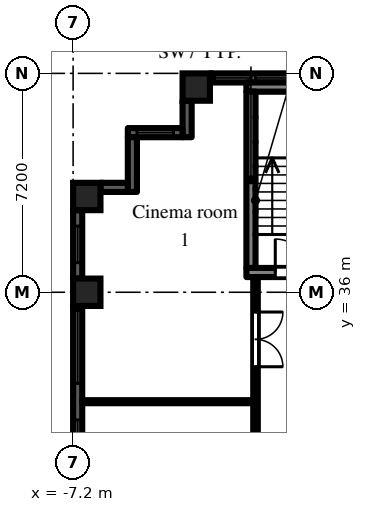
"""IFC4 building model, lengths in metres.
Left out: names, types, materials, properties, quantities, classifications, styles, units other than length and angle.
Written with IfcOpenShell. Run it as: python <this file> out.ifc"""

import sys

from ifc_helpers import new_model, si_unit, direction, frame, frame_2d, origin, origin_2d, place, context, subcontext, project, spatial, rectangle, extrude, element, fill, save


model = new_model("IFC4")
c1 = context("Model", 3, precision=1e-05, world=origin(), true_north=direction((0.0, 1.0)))
c2 = subcontext(c1, "Body", "Model", "MODEL_VIEW")
j1 = project(units=[si_unit("LENGTHUNIT", "METRE"), si_unit("PLANEANGLEUNIT", "RADIAN")], contexts=[c1])
p1 = place(None, origin())
s1 = spatial("IfcSite", under=j1, at=p1, CompositionType="ELEMENT")
p2 = place(p1, origin())
s2 = spatial("IfcBuilding", under=s1, at=p2, CompositionType="ELEMENT")
p3 = place(p2, frame((0.0, 0.0, 35.7)))
s3 = spatial("IfcBuildingStorey", under=s2, at=p3, CompositionType="ELEMENT", Elevation=35.7)
for number, where, z_axis, x_axis in (
    (1, (-6.75, 36.0, 0.0), (0.0, 0.0, 1.0), (1.0, 0.0, 0.0)),
    (2, (-6.75, 39.15, 0.0), (0.0, 0.0, 1.0), (1.0, 0.0, 0.0)),
    (3, (-3.15, 42.75, 0.0), (0.0, 0.0, 1.0), (1.0, 0.0, 0.0)),
):
    element("IfcColumn", number, at=place(p3, frame(where, z_axis=z_axis, x_axis=x_axis)), inside=s3, PredefinedType="COLUMN", context=c2, shape_type="SweptSolid", body=[
        extrude(rectangle(XDim=0.9, YDim=0.9, at=origin_2d()), origin(), (0.0, 0.0, 1.0), 3.0),
    ])
p4 = place(p3, frame((2.7, 43.05, 0.0), z_axis=(0.0, 0.0, 1.0), x_axis=(-1.0, 0.0, 0.0)))
e4 = element("IfcWall", 4, at=p4, inside=s3, PredefinedType="SOLIDWALL", context=c2, shape_type="SweptSolid", body=[
    extrude(rectangle(XDim=5.4, YDim=0.3, at=frame_2d((2.7, 0.0))), origin(), (0.0, 0.0, 1.0), 2.1),
])
p5 = place(p4, frame((1.5, 0.0, 0.2)))
e5 = element("IfcOpeningElement", 5, at=p5, cuts=e4, PredefinedType="OPENING", context=c2, shape_type="SweptSolid", body=[
    extrude(rectangle(XDim=2.4, YDim=1.85, at=frame_2d((1.2, 0.925))), frame((0.0, 0.16, 0.0), z_axis=(0.0, -1.0, 0.0), x_axis=(1.0, 0.0, 0.0)), (0.0, 0.0, 1.0), 0.32),
])
p6 = place(p4, frame((0.15, 0.0, 0.2)))
e6 = element("IfcOpeningElement", 6, at=p6, cuts=e4, PredefinedType="OPENING", context=c2, shape_type="SweptSolid", body=[
    extrude(rectangle(XDim=1.2, YDim=1.85, at=frame_2d((0.6, 0.925))), frame((0.0, 0.16, 0.0), z_axis=(0.0, -1.0, 0.0), x_axis=(1.0, 0.0, 0.0)), (0.0, 0.0, 1.0), 0.32),
])
p7 = place(p4, frame((4.05, 0.0, 0.2)))
e7 = element("IfcOpeningElement", 7, at=p7, cuts=e4, PredefinedType="OPENING", context=c2, shape_type="SweptSolid", body=[
    extrude(rectangle(XDim=1.2, YDim=1.85, at=frame_2d((0.6, 0.925))), frame((0.0, 0.16, 0.0), z_axis=(0.0, -1.0, 0.0), x_axis=(1.0, 0.0, 0.0)), (0.0, 0.0, 1.0), 0.32),
])
p8 = place(p3, frame((-3.45, 42.3, 0.0), z_axis=(0.0, 0.0, 1.0), x_axis=(0.0, -1.0, 0.0)))
e8 = element("IfcWall", 8, at=p8, inside=s3, PredefinedType="SOLIDWALL", context=c2, shape_type="SweptSolid", body=[
    extrude(rectangle(XDim=1.2, YDim=0.3, at=frame_2d((0.6, 0.0))), origin(), (0.0, 0.0, 1.0), 2.575),
])
p9 = place(p3, frame((-3.6, 41.25, 0.0), z_axis=(0.0, 0.0, 1.0), x_axis=(-1.0, 0.0, 0.0)))
e9 = element("IfcWall", 9, at=p9, inside=s3, PredefinedType="SOLIDWALL", context=c2, shape_type="SweptSolid", body=[
    extrude(rectangle(XDim=1.8, YDim=0.3, at=frame_2d((0.9, 0.0))), origin(), (0.0, 0.0, 1.0), 2.575),
])
p10 = place(p9, frame((0.3, 0.0, 0.2)))
e10 = element("IfcOpeningElement", 10, at=p10, cuts=e9, PredefinedType="OPENING", context=c2, shape_type="SweptSolid", body=[
    extrude(rectangle(XDim=1.2, YDim=1.85, at=frame_2d((0.6, 0.925))), frame((0.0, 0.16, 0.0), z_axis=(0.0, -1.0, 0.0), x_axis=(1.0, 0.0, 0.0)), (0.0, 0.0, 1.0), 0.32),
])
p11 = place(p3, frame((-5.25, 41.1, 0.0), z_axis=(0.0, 0.0, 1.0), x_axis=(0.0, -1.0, 0.0)))
e11 = element("IfcWall", 11, at=p11, inside=s3, PredefinedType="SOLIDWALL", context=c2, shape_type="SweptSolid", body=[
    extrude(rectangle(XDim=1.8, YDim=0.3, at=frame_2d((0.9, 0.0))), origin(), (0.0, 0.0, 1.0), 2.575),
])
p12 = place(p3, frame((-5.4, 39.45, 0.0), z_axis=(0.0, 0.0, 1.0), x_axis=(-1.0, 0.0, 0.0)))
e12 = element("IfcWall", 12, at=p12, inside=s3, PredefinedType="SOLIDWALL", context=c2, shape_type="SweptSolid", body=[
    extrude(rectangle(XDim=0.9, YDim=0.3, at=frame_2d((0.45, 0.0))), origin(), (0.0, 0.0, 1.0), 2.575),
])
p13 = place(p3, frame((-7.05, 38.7, 0.0), z_axis=(0.0, 0.0, 1.0), x_axis=(0.0, -1.0, 0.0)))
e13 = element("IfcWall", 13, at=p13, inside=s3, PredefinedType="SOLIDWALL", context=c2, shape_type="SweptSolid", body=[
    extrude(rectangle(XDim=2.25, YDim=0.3, at=frame_2d((1.125, 0.0))), origin(), (0.0, 0.0, 1.0), 2.1),
])
p14 = place(p13, frame((0.525, 0.0, 0.2)))
e14 = element("IfcOpeningElement", 14, at=p14, cuts=e13, PredefinedType="OPENING", context=c2, shape_type="SweptSolid", body=[
    extrude(rectangle(XDim=1.2, YDim=1.85, at=frame_2d((0.6, 0.925))), frame((0.0, 0.16, 0.0), z_axis=(0.0, -1.0, 0.0), x_axis=(1.0, 0.0, 0.0)), (0.0, 0.0, 1.0), 0.32),
])
p15 = place(p3, frame((-7.05, 35.55, 0.0), z_axis=(0.0, 0.0, 1.0), x_axis=(0.0, -1.0, 0.0)))
e15 = element("IfcWall", 15, at=p15, inside=s3, PredefinedType="SOLIDWALL", context=c2, shape_type="SweptSolid", body=[
    extrude(rectangle(XDim=6.3, YDim=0.3, at=frame_2d((3.15, 0.0))), origin(), (0.0, 0.0, 1.0), 2.1),
])
p16 = place(p15, frame((0.15, 0.0, 0.2)))
e16 = element("IfcOpeningElement", 16, at=p16, cuts=e15, PredefinedType="OPENING", context=c2, shape_type="SweptSolid", body=[
    extrude(rectangle(XDim=2.4, YDim=1.85, at=frame_2d((1.2, 0.925))), frame((0.0, 0.16, 0.0), z_axis=(0.0, -1.0, 0.0), x_axis=(1.0, 0.0, 0.0)), (0.0, 0.0, 1.0), 0.32),
])
p17 = place(p15, frame((3.75, 0.0, 0.2)))
e17 = element("IfcOpeningElement", 17, at=p17, cuts=e15, PredefinedType="OPENING", context=c2, shape_type="SweptSolid", body=[
    extrude(rectangle(XDim=2.4, YDim=1.85, at=frame_2d((1.2, 0.925))), frame((0.0, 0.16, 0.0), z_axis=(0.0, -1.0, 0.0), x_axis=(1.0, 0.0, 0.0)), (0.0, 0.0, 1.0), 0.32),
])
p18 = place(p3, frame((-1.5, 36.65, 0.0), z_axis=(0.0, 0.0, 1.0), x_axis=(1.0, 0.0, 0.0)))
e18 = element("IfcWall", 18, at=p18, inside=s3, PredefinedType="SHEAR", context=c2, shape_type="SweptSolid", body=[
    extrude(rectangle(XDim=3.0, YDim=0.3, at=frame_2d((1.5, 0.0))), origin(), (0.0, 0.0, 1.0), 2.575),
])
p19 = place(p18, frame((0.95, 0.0, 0.0)))
e19 = element("IfcOpeningElement", 19, at=p19, cuts=e18, PredefinedType="OPENING", context=c2, shape_type="SweptSolid", body=[
    extrude(rectangle(XDim=1.1, YDim=2.1, at=frame_2d((0.55, 1.05))), frame((0.0, 0.16, 0.0), z_axis=(0.0, -1.0, 0.0), x_axis=(1.0, 0.0, 0.0)), (0.0, 0.0, 1.0), 0.32),
])
p20 = place(p3, frame((-1.5, 42.75, 0.0), z_axis=(0.0, 0.0, 1.0), x_axis=(1.0, 0.0, 0.0)))
e20 = element("IfcWall", 20, at=p20, inside=s3, PredefinedType="SHEAR", context=c2, shape_type="SweptSolid", body=[
    extrude(rectangle(XDim=3.0, YDim=0.3, at=frame_2d((1.5, 0.0))), origin(), (0.0, 0.0, 1.0), 2.575),
])
p21 = place(p3, frame((-1.35, 36.8, 0.0), z_axis=(0.0, 0.0, 1.0), x_axis=(0.0, 1.0, 0.0)))
e21 = element("IfcWall", 21, at=p21, inside=s3, PredefinedType="SHEAR", context=c2, shape_type="SweptSolid", body=[
    extrude(rectangle(XDim=5.8, YDim=0.3, at=frame_2d((2.9, 0.0))), origin(), (0.0, 0.0, 1.0), 2.575),
])
p22 = place(p3, frame((-6.9, 32.4, 0.0), z_axis=(0.0, 0.0, 1.0), x_axis=(1.0, 0.0, 0.0)))
e22 = element("IfcWall", 22, at=p22, inside=s3, PredefinedType="PARTITIONING", context=c2, shape_type="SweptSolid", body=[
    extrude(rectangle(XDim=5.625, YDim=0.1, at=frame_2d((2.812, 0.0))), origin(), (0.0, 0.0, 1.0), 2.575),
])
p23 = place(p3, frame((-1.2, 1.275, 0.0), z_axis=(0.0, 0.0, 1.0), x_axis=(0.0, 1.0, 0.0)))
e23 = element("IfcWall", 23, at=p23, inside=s3, PredefinedType="PARTITIONING", context=c2, shape_type="SweptSolid", body=[
    extrude(rectangle(XDim=35.225, YDim=0.15, at=frame_2d((17.613, 0.0))), origin(), (0.0, 0.0, 1.0), 2.575),
])
p24 = place(p23, frame((3.575, 0.0, 0.0)))
e24 = element("IfcOpeningElement", 24, at=p24, cuts=e23, PredefinedType="OPENING", context=c2, shape_type="SweptSolid", body=[
    extrude(rectangle(XDim=0.9, YDim=2.1, at=frame_2d((0.45, 1.05))), frame((0.0, 0.085, 0.0), z_axis=(0.0, -1.0, 0.0), x_axis=(1.0, 0.0, 0.0)), (0.0, 0.0, 1.0), 0.17),
])
p25 = place(p23, frame((10.875, 0.0, 0.0)))
e25 = element("IfcOpeningElement", 25, at=p25, cuts=e23, PredefinedType="OPENING", context=c2, shape_type="SweptSolid", body=[
    extrude(rectangle(XDim=0.9, YDim=2.1, at=frame_2d((0.45, 1.05))), frame((0.0, 0.085, 0.0), z_axis=(0.0, -1.0, 0.0), x_axis=(1.0, 0.0, 0.0)), (0.0, 0.0, 1.0), 0.17),
])
p26 = place(p23, frame((19.125, 0.0, 0.0)))
e26 = element("IfcOpeningElement", 26, at=p26, cuts=e23, PredefinedType="OPENING", context=c2, shape_type="SweptSolid", body=[
    extrude(rectangle(XDim=1.0, YDim=2.1, at=frame_2d((0.5, 1.05))), frame((0.0, 0.085, 0.0), z_axis=(0.0, -1.0, 0.0), x_axis=(1.0, 0.0, 0.0)), (0.0, 0.0, 1.0), 0.17),
])
p27 = place(p23, frame((23.025, 0.0, 0.0)))
e27 = element("IfcOpeningElement", 27, at=p27, cuts=e23, PredefinedType="OPENING", context=c2, shape_type="SweptSolid", body=[
    extrude(rectangle(XDim=1.8, YDim=2.1, at=frame_2d((0.9, 1.05))), frame((0.0, 0.085, 0.0), z_axis=(0.0, -1.0, 0.0), x_axis=(1.0, 0.0, 0.0)), (0.0, 0.0, 1.0), 0.17),
])
p28 = place(p23, frame((28.875, 0.0, 0.0)))
e28 = element("IfcOpeningElement", 28, at=p28, cuts=e23, PredefinedType="OPENING", context=c2, shape_type="SweptSolid", body=[
    extrude(rectangle(XDim=0.9, YDim=2.1, at=frame_2d((0.45, 1.05))), frame((0.0, 0.085, 0.0), z_axis=(0.0, -1.0, 0.0), x_axis=(1.0, 0.0, 0.0)), (0.0, 0.0, 1.0), 0.17),
])
p29 = place(p23, frame((32.275, 0.0, 0.0)))
e29 = element("IfcOpeningElement", 29, at=p29, cuts=e23, PredefinedType="OPENING", context=c2, shape_type="SweptSolid", body=[
    extrude(rectangle(XDim=1.8, YDim=2.1, at=frame_2d((0.9, 1.05))), frame((0.0, 0.085, 0.0), z_axis=(0.0, -1.0, 0.0), x_axis=(1.0, 0.0, 0.0)), (0.0, 0.0, 1.0), 0.17),
])
p30 = place(p5, origin())
e30 = element("IfcWindow", 30, at=p30, inside=s3, PartitioningType="SINGLE_PANEL", PredefinedType="WINDOW", context=c2, shape_type="SweptSolid", body=[
    extrude(rectangle(XDim=2.4, YDim=1.85, at=frame_2d((1.2, 0.925))), frame((0.0, 0.03, 0.0), z_axis=(0.0, -1.0, 0.0), x_axis=(1.0, 0.0, 0.0)), (0.0, 0.0, 1.0), 0.06),
])
fill(e5, e30)
p31 = place(p7, origin())
e31 = element("IfcWindow", 31, at=p31, inside=s3, PartitioningType="SINGLE_PANEL", PredefinedType="WINDOW", context=c2, shape_type="SweptSolid", body=[
    extrude(rectangle(XDim=1.2, YDim=1.85, at=frame_2d((0.6, 0.925))), frame((0.0, 0.03, 0.0), z_axis=(0.0, -1.0, 0.0), x_axis=(1.0, 0.0, 0.0)), (0.0, 0.0, 1.0), 0.06),
])
fill(e7, e31)
p32 = place(p10, origin())
e32 = element("IfcWindow", 32, at=p32, inside=s3, PartitioningType="SINGLE_PANEL", PredefinedType="WINDOW", context=c2, shape_type="SweptSolid", body=[
    extrude(rectangle(XDim=1.2, YDim=1.85, at=frame_2d((0.6, 0.925))), frame((0.0, 0.03, 0.0), z_axis=(0.0, -1.0, 0.0), x_axis=(1.0, 0.0, 0.0)), (0.0, 0.0, 1.0), 0.06),
])
fill(e10, e32)
p33 = place(p14, origin())
e33 = element("IfcWindow", 33, at=p33, inside=s3, PartitioningType="SINGLE_PANEL", PredefinedType="WINDOW", context=c2, shape_type="SweptSolid", body=[
    extrude(rectangle(XDim=1.2, YDim=1.85, at=frame_2d((0.6, 0.925))), frame((0.0, 0.03, 0.0), z_axis=(0.0, -1.0, 0.0), x_axis=(1.0, 0.0, 0.0)), (0.0, 0.0, 1.0), 0.06),
])
fill(e14, e33)
p34 = place(p16, origin())
e34 = element("IfcWindow", 34, at=p34, inside=s3, PartitioningType="SINGLE_PANEL", PredefinedType="WINDOW", context=c2, shape_type="SweptSolid", body=[
    extrude(rectangle(XDim=2.4, YDim=1.85, at=frame_2d((1.2, 0.925))), frame((0.0, 0.03, 0.0), z_axis=(0.0, -1.0, 0.0), x_axis=(1.0, 0.0, 0.0)), (0.0, 0.0, 1.0), 0.06),
])
fill(e16, e34)
p35 = place(p17, origin())
e35 = element("IfcWindow", 35, at=p35, inside=s3, PartitioningType="SINGLE_PANEL", PredefinedType="WINDOW", context=c2, shape_type="SweptSolid", body=[
    extrude(rectangle(XDim=2.4, YDim=1.85, at=frame_2d((1.2, 0.925))), frame((0.0, 0.03, 0.0), z_axis=(0.0, -1.0, 0.0), x_axis=(1.0, 0.0, 0.0)), (0.0, 0.0, 1.0), 0.06),
])
fill(e17, e35)
p36 = place(p19, origin())
e36 = element("IfcDoor", 36, at=p36, inside=s3, OperationType="SINGLE_SWING_LEFT", PredefinedType="DOOR", context=c2, shape_type="SweptSolid", body=[
    extrude(rectangle(XDim=1.1, YDim=2.1, at=frame_2d((0.55, 1.05))), frame((0.0, 0.025, 0.0), z_axis=(0.0, -1.0, 0.0), x_axis=(1.0, 0.0, 0.0)), (0.0, 0.0, 1.0), 0.05),
])
fill(e19, e36)
p37 = place(p29, frame((1.8, 0.0, 0.0), z_axis=(0.0, 0.0, 1.0), x_axis=(-1.0, 0.0, 0.0)))
e37 = element("IfcDoor", 37, at=p37, inside=s3, OperationType="DOUBLE_DOOR_DOUBLE_SWING", PredefinedType="DOOR", context=c2, shape_type="SweptSolid", body=[
    extrude(rectangle(XDim=1.8, YDim=2.1, at=frame_2d((0.9, 1.05))), frame((0.0, 0.025, 0.0), z_axis=(0.0, -1.0, 0.0), x_axis=(1.0, 0.0, 0.0)), (0.0, 0.0, 1.0), 0.05),
])
fill(e29, e37)
save(model, sys.argv[1])
